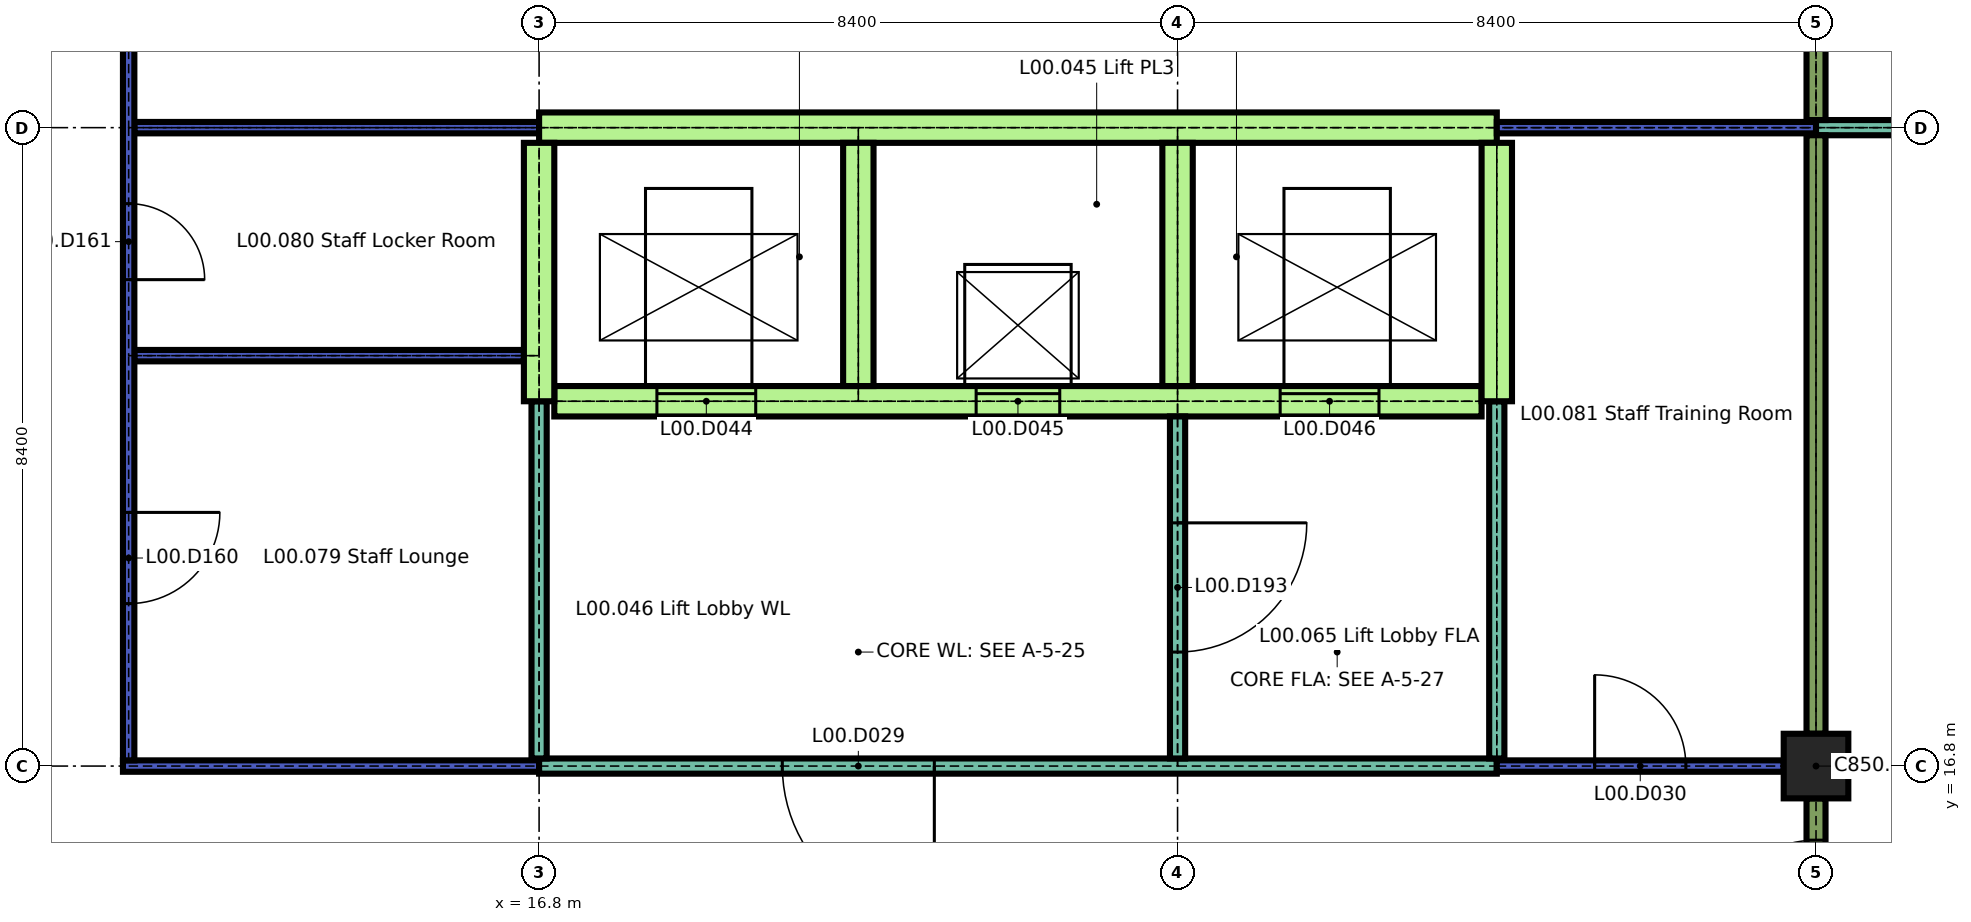
"""IFC4 building model, lengths in metres.
Left out: names, types, materials, properties, quantities, classifications, styles, units other than length and angle.
Written with IfcOpenShell. Run it as: python <this file> out.ifc"""

import sys

from ifc_helpers import new_model, si_unit, direction, frame, frame_2d, origin, origin_2d, place, context, subcontext, project, spatial, rectangle, extrude, element, fill, save


model = new_model("IFC4")
c1 = context("Model", 3, precision=1e-05, world=origin(), true_north=direction((0.0, 1.0)))
c2 = subcontext(c1, "Body", "Model", "MODEL_VIEW")
j1 = project(units=[si_unit("LENGTHUNIT", "METRE"), si_unit("PLANEANGLEUNIT", "RADIAN")], contexts=[c1])
p1 = place(None, origin())
s1 = spatial("IfcSite", under=j1, at=p1, CompositionType="ELEMENT")
p2 = place(p1, origin())
s2 = spatial("IfcBuilding", under=s1, at=p2, CompositionType="ELEMENT")
p3 = place(p2, origin())
s3 = spatial("IfcBuildingStorey", under=s2, at=p3, CompositionType="ELEMENT", Elevation=0.0)
p4 = place(p3, frame((33.6, 16.8, 0.0), z_axis=(0.0, 0.0, 1.0), x_axis=(1.0, 0.0, 0.0)))
e1 = element("IfcColumn", 1, at=p4, inside=s3, PredefinedType="COLUMN", context=c2, shape_type="SweptSolid", body=[
    extrude(rectangle(XDim=0.85, YDim=0.85, at=origin_2d()), origin(), (0.0, 0.0, 1.0), 4.14),
])
p5 = place(p3, frame((11.325, 16.8, 0.0), z_axis=(0.0, 0.0, 1.0), x_axis=(1.0, 0.0, 0.0)))
e2 = element("IfcWall", 2, at=p5, inside=s3, PredefinedType="PARTITIONING", context=c2, shape_type="SweptSolid", body=[
    extrude(rectangle(XDim=5.475, YDim=0.15, at=frame_2d((2.738, 0.0))), origin(), (0.0, 0.0, 1.0), 4.14),
])
p6 = place(p3, frame((16.8, 16.8, 0.0), z_axis=(0.0, 0.0, 1.0), x_axis=(1.0, 0.0, 0.0)))
e3 = element("IfcWall", 3, at=p6, inside=s3, PredefinedType="PARTITIONING", context=c2, shape_type="SweptSolid", body=[
    extrude(rectangle(XDim=12.6, YDim=0.2, at=frame_2d((6.3, 0.0))), origin(), (0.0, 0.0, 1.0), 4.14),
])
p7 = place(p6, frame((3.2, 0.0, 0.0)))
e4 = element("IfcOpeningElement", 4, at=p7, cuts=e3, PredefinedType="OPENING", context=c2, shape_type="SweptSolid", body=[
    extrude(rectangle(XDim=2.0, YDim=2.4, at=frame_2d((1.0, 1.2))), frame((0.0, 0.11, 0.0), z_axis=(0.0, -1.0, 0.0), x_axis=(1.0, 0.0, 0.0)), (0.0, 0.0, 1.0), 0.22),
])
p8 = place(p3, frame((29.4, 16.8, 0.0), z_axis=(0.0, 0.0, 1.0), x_axis=(1.0, 0.0, 0.0)))
e5 = element("IfcWall", 5, at=p8, inside=s3, PredefinedType="PARTITIONING", context=c2, shape_type="SweptSolid", body=[
    extrude(rectangle(XDim=3.775, YDim=0.15, at=frame_2d((1.888, 0.0))), origin(), (0.0, 0.0, 1.0), 4.14),
])
p9 = place(p8, frame((1.288, 0.0, 0.0)))
e6 = element("IfcOpeningElement", 6, at=p9, cuts=e5, PredefinedType="OPENING", context=c2, shape_type="SweptSolid", body=[
    extrude(rectangle(XDim=1.2, YDim=2.1, at=frame_2d((0.6, 1.05))), frame((0.0, 0.085, 0.0), z_axis=(0.0, -1.0, 0.0), x_axis=(1.0, 0.0, 0.0)), (0.0, 0.0, 1.0), 0.17),
])
p10 = place(p3, frame((17.0, 21.6, 0.0), z_axis=(0.0, 0.0, 1.0), x_axis=(1.0, 0.0, 0.0)))
e7 = element("IfcWall", 7, at=p10, inside=s3, PredefinedType="SHEAR", context=c2, shape_type="SweptSolid", body=[
    extrude(rectangle(XDim=12.2, YDim=0.4, at=frame_2d((6.1, 0.0))), origin(), (0.0, 0.0, 1.0), 4.14),
])
p11 = place(p10, frame((1.35, 0.0, 0.0)))
e8 = element("IfcOpeningElement", 8, at=p11, cuts=e7, PredefinedType="OPENING", context=c2, shape_type="SweptSolid", body=[
    extrude(rectangle(XDim=1.3, YDim=2.1, at=frame_2d((0.65, 1.05))), frame((0.0, 0.21, 0.0), z_axis=(0.0, -1.0, 0.0), x_axis=(1.0, 0.0, 0.0)), (0.0, 0.0, 1.0), 0.42),
])
p12 = place(p10, frame((5.55, 0.0, 0.0)))
e9 = element("IfcOpeningElement", 9, at=p12, cuts=e7, PredefinedType="OPENING", context=c2, shape_type="SweptSolid", body=[
    extrude(rectangle(XDim=1.1, YDim=2.1, at=frame_2d((0.55, 1.05))), frame((0.0, 0.21, 0.0), z_axis=(0.0, -1.0, 0.0), x_axis=(1.0, 0.0, 0.0)), (0.0, 0.0, 1.0), 0.42),
])
p13 = place(p10, frame((9.55, 0.0, 0.0)))
e10 = element("IfcOpeningElement", 10, at=p13, cuts=e7, PredefinedType="OPENING", context=c2, shape_type="SweptSolid", body=[
    extrude(rectangle(XDim=1.3, YDim=2.1, at=frame_2d((0.65, 1.05))), frame((0.0, 0.21, 0.0), z_axis=(0.0, -1.0, 0.0), x_axis=(1.0, 0.0, 0.0)), (0.0, 0.0, 1.0), 0.42),
])
p14 = place(p3, frame((11.475, 22.2, 0.0), z_axis=(0.0, 0.0, 1.0), x_axis=(1.0, 0.0, 0.0)))
e11 = element("IfcWall", 11, at=p14, inside=s3, PredefinedType="PARTITIONING", context=c2, shape_type="SweptSolid", body=[
    extrude(rectangle(XDim=5.125, YDim=0.15, at=frame_2d((2.562, 0.0))), origin(), (0.0, 0.0, 1.0), 4.14),
])
p15 = place(p3, frame((11.475, 25.2, 0.0), z_axis=(0.0, 0.0, 1.0), x_axis=(1.0, 0.0, 0.0)))
e12 = element("IfcWall", 12, at=p15, inside=s3, PredefinedType="PARTITIONING", context=c2, shape_type="SweptSolid", body=[
    extrude(rectangle(XDim=5.325, YDim=0.15, at=frame_2d((2.663, 0.0))), origin(), (0.0, 0.0, 1.0), 4.14),
])
p16 = place(p3, frame((16.8, 25.2, 0.0), z_axis=(0.0, 0.0, 1.0), x_axis=(1.0, 0.0, 0.0)))
e13 = element("IfcWall", 13, at=p16, inside=s3, PredefinedType="SHEAR", context=c2, shape_type="SweptSolid", body=[
    extrude(rectangle(XDim=12.6, YDim=0.4, at=frame_2d((6.3, 0.0))), origin(), (0.0, 0.0, 1.0), 4.14),
])
p17 = place(p3, frame((29.4, 25.2, 0.0), z_axis=(0.0, 0.0, 1.0), x_axis=(1.0, 0.0, 0.0)))
e14 = element("IfcWall", 14, at=p17, inside=s3, PredefinedType="PARTITIONING", context=c2, shape_type="SweptSolid", body=[
    extrude(rectangle(XDim=4.2, YDim=0.15, at=frame_2d((2.1, 0.0))), origin(), (0.0, 0.0, 1.0), 4.14),
])
p18 = place(p3, frame((33.6, 25.2, 0.0), z_axis=(0.0, 0.0, 1.0), x_axis=(1.0, 0.0, 0.0)))
e15 = element("IfcWall", 15, at=p18, inside=s3, PredefinedType="PARTITIONING", context=c2, shape_type="SweptSolid", body=[
    extrude(rectangle(XDim=8.4, YDim=0.2, at=frame_2d((4.2, 0.0))), origin(), (0.0, 0.0, 1.0), 4.14),
])
p19 = place(p18, frame((3.5, 0.0, 0.0)))
e16 = element("IfcOpeningElement", 16, at=p19, cuts=e15, PredefinedType="OPENING", context=c2, shape_type="SweptSolid", body=[
    extrude(rectangle(XDim=1.4, YDim=2.1, at=frame_2d((0.7, 1.05))), frame((0.0, 0.11, 0.0), z_axis=(0.0, -1.0, 0.0), x_axis=(1.0, 0.0, 0.0)), (0.0, 0.0, 1.0), 0.22),
])
p20 = place(p3, frame((11.4, 16.875, 0.0), z_axis=(0.0, 0.0, 1.0), x_axis=(0.0, 1.0, 0.0)))
e17 = element("IfcWall", 17, at=p20, inside=s3, PredefinedType="PARTITIONING", context=c2, shape_type="SweptSolid", body=[
    extrude(rectangle(XDim=16.65, YDim=0.15, at=frame_2d((8.325, 0.0))), origin(), (0.0, 0.0, 1.0), 4.14),
])
p21 = place(p20, frame((2.062, 0.0, 0.0)))
e18 = element("IfcOpeningElement", 18, at=p21, cuts=e17, PredefinedType="OPENING", context=c2, shape_type="SweptSolid", body=[
    extrude(rectangle(XDim=1.2, YDim=2.1, at=frame_2d((0.6, 1.05))), frame((0.0, 0.085, 0.0), z_axis=(0.0, -1.0, 0.0), x_axis=(1.0, 0.0, 0.0)), (0.0, 0.0, 1.0), 0.17),
])
p22 = place(p20, frame((6.325, 0.0, 0.0)))
e19 = element("IfcOpeningElement", 19, at=p22, cuts=e17, PredefinedType="OPENING", context=c2, shape_type="SweptSolid", body=[
    extrude(rectangle(XDim=1.0, YDim=2.1, at=frame_2d((0.5, 1.05))), frame((0.0, 0.085, 0.0), z_axis=(0.0, -1.0, 0.0), x_axis=(1.0, 0.0, 0.0)), (0.0, 0.0, 1.0), 0.17),
])
p23 = place(p20, frame((11.788, 0.0, 0.0)))
e20 = element("IfcOpeningElement", 20, at=p23, cuts=e17, PredefinedType="OPENING", context=c2, shape_type="SweptSolid", body=[
    extrude(rectangle(XDim=1.4, YDim=2.1, at=frame_2d((0.7, 1.05))), frame((0.0, 0.085, 0.0), z_axis=(0.0, -1.0, 0.0), x_axis=(1.0, 0.0, 0.0)), (0.0, 0.0, 1.0), 0.17),
])
p24 = place(p3, frame((16.8, 16.9, 0.0), z_axis=(0.0, 0.0, 1.0), x_axis=(0.0, 1.0, 0.0)))
e21 = element("IfcWall", 21, at=p24, inside=s3, PredefinedType="PARTITIONING", context=c2, shape_type="SweptSolid", body=[
    extrude(rectangle(XDim=4.7, YDim=0.2, at=frame_2d((2.35, 0.0))), origin(), (0.0, 0.0, 1.0), 4.14),
])
p25 = place(p3, frame((16.8, 21.6, 0.0), z_axis=(0.0, 0.0, 1.0), x_axis=(0.0, 1.0, 0.0)))
e22 = element("IfcWall", 22, at=p25, inside=s3, PredefinedType="SHEAR", context=c2, shape_type="SweptSolid", body=[
    extrude(rectangle(XDim=3.4, YDim=0.4, at=frame_2d((1.7, 0.0))), origin(), (0.0, 0.0, 1.0), 4.14),
])
p26 = place(p3, frame((21.0, 21.8, 0.0), z_axis=(0.0, 0.0, 1.0), x_axis=(0.0, 1.0, 0.0)))
e23 = element("IfcWall", 23, at=p26, inside=s3, PredefinedType="SHEAR", context=c2, shape_type="SweptSolid", body=[
    extrude(rectangle(XDim=3.2, YDim=0.4, at=frame_2d((1.6, 0.0))), origin(), (0.0, 0.0, 1.0), 4.14),
])
p27 = place(p3, frame((25.2, 16.9, 0.0), z_axis=(0.0, 0.0, 1.0), x_axis=(0.0, 1.0, 0.0)))
e24 = element("IfcWall", 24, at=p27, inside=s3, PredefinedType="PARTITIONING", context=c2, shape_type="SweptSolid", body=[
    extrude(rectangle(XDim=4.5, YDim=0.2, at=frame_2d((2.25, 0.0))), origin(), (0.0, 0.0, 1.0), 4.14),
])
p28 = place(p27, frame((1.4, 0.0, 0.0)))
e25 = element("IfcOpeningElement", 25, at=p28, cuts=e24, PredefinedType="OPENING", context=c2, shape_type="SweptSolid", body=[
    extrude(rectangle(XDim=1.7, YDim=2.4, at=frame_2d((0.85, 1.2))), frame((0.0, 0.11, 0.0), z_axis=(0.0, -1.0, 0.0), x_axis=(1.0, 0.0, 0.0)), (0.0, 0.0, 1.0), 0.22),
])
p29 = place(p3, frame((25.2, 21.8, 0.0), z_axis=(0.0, 0.0, 1.0), x_axis=(0.0, 1.0, 0.0)))
e26 = element("IfcWall", 26, at=p29, inside=s3, PredefinedType="SHEAR", context=c2, shape_type="SweptSolid", body=[
    extrude(rectangle(XDim=3.2, YDim=0.4, at=frame_2d((1.6, 0.0))), origin(), (0.0, 0.0, 1.0), 4.14),
])
p30 = place(p3, frame((29.4, 16.9, 0.0), z_axis=(0.0, 0.0, 1.0), x_axis=(0.0, 1.0, 0.0)))
e27 = element("IfcWall", 27, at=p30, inside=s3, PredefinedType="PARTITIONING", context=c2, shape_type="SweptSolid", body=[
    extrude(rectangle(XDim=4.7, YDim=0.2, at=frame_2d((2.35, 0.0))), origin(), (0.0, 0.0, 1.0), 4.14),
])
p31 = place(p3, frame((29.4, 21.6, 0.0), z_axis=(0.0, 0.0, 1.0), x_axis=(0.0, 1.0, 0.0)))
e28 = element("IfcWall", 28, at=p31, inside=s3, PredefinedType="SHEAR", context=c2, shape_type="SweptSolid", body=[
    extrude(rectangle(XDim=3.4, YDim=0.4, at=frame_2d((1.7, 0.0))), origin(), (0.0, 0.0, 1.0), 4.14),
])
p32 = place(p3, frame((33.6, 13.875, 0.0), z_axis=(0.0, 0.0, 1.0), x_axis=(0.0, 1.0, 0.0)))
e29 = element("IfcWall", 29, at=p32, inside=s3, PredefinedType="SOLIDWALL", context=c2, shape_type="SweptSolid", body=[
    extrude(rectangle(XDim=2.5, YDim=0.25, at=frame_2d((1.25, 0.0))), origin(), (0.0, 0.0, 1.0), 4.14),
])
p33 = place(p32, frame((0.55, 0.0, 0.0)))
e30 = element("IfcOpeningElement", 30, at=p33, cuts=e29, PredefinedType="OPENING", context=c2, shape_type="SweptSolid", body=[
    extrude(rectangle(XDim=1.4, YDim=2.1, at=frame_2d((0.7, 1.05))), frame((0.0, 0.135, 0.0), z_axis=(0.0, -1.0, 0.0), x_axis=(1.0, 0.0, 0.0)), (0.0, 0.0, 1.0), 0.27),
])
p34 = place(p3, frame((33.6, 17.225, 0.0), z_axis=(0.0, 0.0, 1.0), x_axis=(0.0, 1.0, 0.0)))
e31 = element("IfcWall", 31, at=p34, inside=s3, PredefinedType="SOLIDWALL", context=c2, shape_type="SweptSolid", body=[
    extrude(rectangle(XDim=7.875, YDim=0.25, at=frame_2d((3.938, 0.0))), origin(), (0.0, 0.0, 1.0), 4.14),
])
p35 = place(p3, frame((33.6, 25.3, 0.0), z_axis=(0.0, 0.0, 1.0), x_axis=(0.0, 1.0, 0.0)))
e32 = element("IfcWall", 32, at=p35, inside=s3, PredefinedType="SOLIDWALL", context=c2, shape_type="SweptSolid", body=[
    extrude(rectangle(XDim=4.7, YDim=0.25, at=frame_2d((2.35, 0.0))), origin(), (0.0, 0.0, 1.0), 4.14),
])
p36 = place(p7, origin())
e33 = element("IfcDoor", 33, at=p36, inside=s3, OperationType="SINGLE_SWING_RIGHT", PredefinedType="DOOR", context=c2, shape_type="SweptSolid", body=[
    extrude(rectangle(XDim=2.0, YDim=2.4, at=frame_2d((1.0, 1.2))), frame((0.0, 0.03, 0.0), z_axis=(0.0, -1.0, 0.0), x_axis=(1.0, 0.0, 0.0)), (0.0, 0.0, 1.0), 0.06),
])
fill(e4, e33)
p37 = place(p9, origin())
e34 = element("IfcDoor", 34, at=p37, inside=s3, OperationType="SINGLE_SWING_RIGHT", PredefinedType="DOOR", context=c2, shape_type="SweptSolid", body=[
    extrude(rectangle(XDim=1.2, YDim=2.1, at=frame_2d((0.6, 1.05))), frame((0.0, 0.025, 0.0), z_axis=(0.0, -1.0, 0.0), x_axis=(1.0, 0.0, 0.0)), (0.0, 0.0, 1.0), 0.05),
])
fill(e6, e34)
p38 = place(p11, origin())
e35 = element("IfcDoor", 35, at=p38, inside=s3, OperationType="SLIDING_TO_LEFT", PredefinedType="DOOR", context=c2, shape_type="SweptSolid", body=[
    extrude(rectangle(XDim=1.3, YDim=2.1, at=frame_2d((0.65, 1.05))), frame((0.0, 0.025, 0.0), z_axis=(0.0, -1.0, 0.0), x_axis=(1.0, 0.0, 0.0)), (0.0, 0.0, 1.0), 0.05),
])
fill(e8, e35)
p39 = place(p12, origin())
e36 = element("IfcDoor", 36, at=p39, inside=s3, OperationType="SLIDING_TO_LEFT", PredefinedType="DOOR", context=c2, shape_type="SweptSolid", body=[
    extrude(rectangle(XDim=1.1, YDim=2.1, at=frame_2d((0.55, 1.05))), frame((0.0, 0.025, 0.0), z_axis=(0.0, -1.0, 0.0), x_axis=(1.0, 0.0, 0.0)), (0.0, 0.0, 1.0), 0.05),
])
fill(e9, e36)
p40 = place(p13, origin())
e37 = element("IfcDoor", 37, at=p40, inside=s3, OperationType="SLIDING_TO_LEFT", PredefinedType="DOOR", context=c2, shape_type="SweptSolid", body=[
    extrude(rectangle(XDim=1.3, YDim=2.1, at=frame_2d((0.65, 1.05))), frame((0.0, 0.025, 0.0), z_axis=(0.0, -1.0, 0.0), x_axis=(1.0, 0.0, 0.0)), (0.0, 0.0, 1.0), 0.05),
])
fill(e10, e37)
p41 = place(p21, origin())
e38 = element("IfcDoor", 38, at=p41, inside=s3, OperationType="SINGLE_SWING_RIGHT", PredefinedType="DOOR", context=c2, shape_type="SweptSolid", body=[
    extrude(rectangle(XDim=1.2, YDim=2.1, at=frame_2d((0.6, 1.05))), frame((0.0, 0.025, 0.0), z_axis=(0.0, -1.0, 0.0), x_axis=(1.0, 0.0, 0.0)), (0.0, 0.0, 1.0), 0.05),
])
fill(e18, e38)
p42 = place(p22, origin())
e39 = element("IfcDoor", 39, at=p42, inside=s3, OperationType="SINGLE_SWING_LEFT", PredefinedType="DOOR", context=c2, shape_type="SweptSolid", body=[
    extrude(rectangle(XDim=1.0, YDim=2.1, at=frame_2d((0.5, 1.05))), frame((0.0, 0.025, 0.0), z_axis=(0.0, -1.0, 0.0), x_axis=(1.0, 0.0, 0.0)), (0.0, 0.0, 1.0), 0.05),
])
fill(e19, e39)
p43 = place(p28, origin())
e40 = element("IfcDoor", 40, at=p43, inside=s3, OperationType="SINGLE_SWING_RIGHT", PredefinedType="DOOR", context=c2, shape_type="SweptSolid", body=[
    extrude(rectangle(XDim=1.7, YDim=2.4, at=frame_2d((0.85, 1.2))), frame((0.0, 0.025, 0.0), z_axis=(0.0, -1.0, 0.0), x_axis=(1.0, 0.0, 0.0)), (0.0, 0.0, 1.0), 0.05),
])
fill(e25, e40)
p44 = place(p33, origin())
e41 = element("IfcDoor", 41, at=p44, inside=s3, OperationType="SINGLE_SWING_RIGHT", PredefinedType="DOOR", context=c2, shape_type="SweptSolid", body=[
    extrude(rectangle(XDim=1.4, YDim=2.1, at=frame_2d((0.7, 1.05))), frame((0.0, 0.03, 0.0), z_axis=(0.0, -1.0, 0.0), x_axis=(1.0, 0.0, 0.0)), (0.0, 0.0, 1.0), 0.06),
])
fill(e30, e41)
save(model, sys.argv[1])
